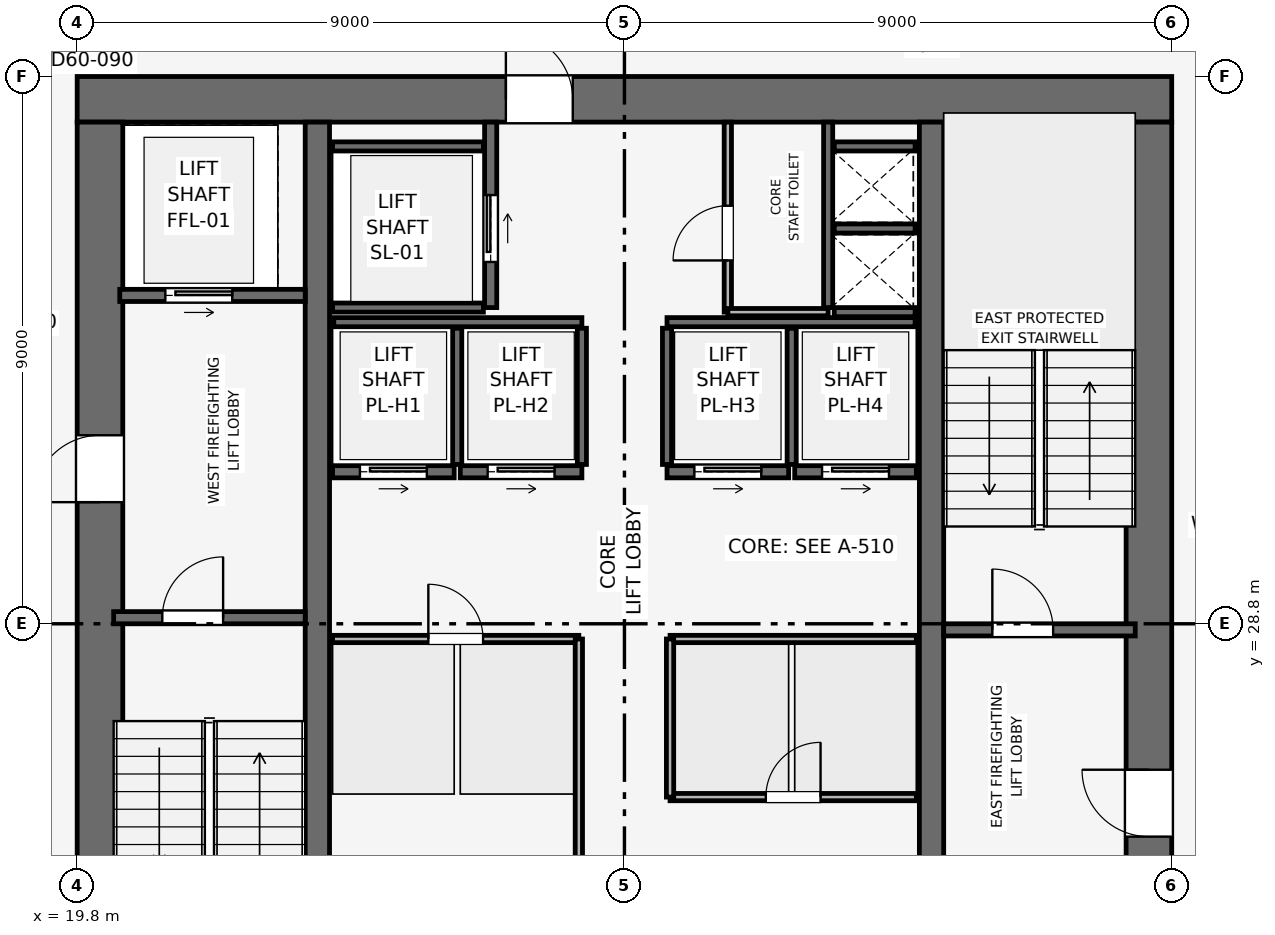
"""IFC4 building model, lengths in metres.
Left out: names, types, materials, properties, quantities, classifications, styles, units other than length and angle.
Written with IfcOpenShell. Run it as: python <this file> out.ifc"""

import sys

from ifc_helpers import new_model, si_unit, direction, frame, frame_2d, origin, place, context, subcontext, project, spatial, rectangle, extrude, element, fill, save


model = new_model("IFC4")
c1 = context("Model", 3, precision=1e-05, world=origin(), true_north=direction((0.0, 1.0)))
c2 = subcontext(c1, "Body", "Model", "MODEL_VIEW")
j1 = project(units=[si_unit("LENGTHUNIT", "METRE"), si_unit("PLANEANGLEUNIT", "RADIAN")], contexts=[c1])
p1 = place(None, origin())
s1 = spatial("IfcSite", under=j1, at=p1, CompositionType="ELEMENT")
p2 = place(p1, origin())
s2 = spatial("IfcBuilding", under=s1, at=p2, CompositionType="ELEMENT")
p3 = place(p2, frame((0.0, 0.0, 276.6)))
s3 = spatial("IfcBuildingStorey", under=s2, at=p3, CompositionType="ELEMENT", Elevation=276.6)
p4 = place(p3, frame((19.8, 37.425, 0.0), z_axis=(0.0, 0.0, 1.0), x_axis=(1.0, 0.0, 0.0)))
e1 = element("IfcWall", 1, at=p4, inside=s3, PredefinedType="SHEAR", context=c2, shape_type="SweptSolid", body=[
    extrude(rectangle(XDim=18.0, YDim=0.75, at=frame_2d((9.0, 0.0))), origin(), (0.0, 0.0, 1.0), 3.75),
])
p5 = place(p4, frame((7.05, 0.0, 0.0)))
e2 = element("IfcOpeningElement", 2, at=p5, cuts=e1, PredefinedType="OPENING", context=c2, shape_type="SweptSolid", body=[
    extrude(rectangle(XDim=1.1, YDim=2.15, at=frame_2d((0.55, 1.075))), frame((0.0, 0.385, 0.0), z_axis=(0.0, -1.0, 0.0), x_axis=(1.0, 0.0, 0.0)), (0.0, 0.0, 1.0), 0.77),
])
p6 = place(p3, frame((20.175, 20.55, 0.0), z_axis=(0.0, 0.0, 1.0), x_axis=(0.0, 1.0, 0.0)))
e3 = element("IfcWall", 3, at=p6, inside=s3, PredefinedType="SHEAR", context=c2, shape_type="SweptSolid", body=[
    extrude(rectangle(XDim=16.5, YDim=0.75, at=frame_2d((8.25, 0.0))), origin(), (0.0, 0.0, 1.0), 3.75),
])
p7 = place(p6, frame((10.25, 0.0, 0.0)))
e4 = element("IfcOpeningElement", 4, at=p7, cuts=e3, PredefinedType="OPENING", context=c2, shape_type="SweptSolid", body=[
    extrude(rectangle(XDim=1.1, YDim=2.15, at=frame_2d((0.55, 1.075))), frame((0.0, 0.385, 0.0), z_axis=(0.0, -1.0, 0.0), x_axis=(1.0, 0.0, 0.0)), (0.0, 0.0, 1.0), 0.77),
])
p8 = place(p3, frame((37.425, 20.55, 0.0), z_axis=(0.0, 0.0, 1.0), x_axis=(0.0, 1.0, 0.0)))
e5 = element("IfcWall", 5, at=p8, inside=s3, PredefinedType="SHEAR", context=c2, shape_type="SweptSolid", body=[
    extrude(rectangle(XDim=16.5, YDim=0.75, at=frame_2d((8.25, 0.0))), origin(), (0.0, 0.0, 1.0), 3.75),
])
p9 = place(p8, frame((4.75, 0.0, 0.0)))
e6 = element("IfcOpeningElement", 6, at=p9, cuts=e5, PredefinedType="OPENING", context=c2, shape_type="SweptSolid", body=[
    extrude(rectangle(XDim=1.1, YDim=2.15, at=frame_2d((0.55, 1.075))), frame((0.0, 0.385, 0.0), z_axis=(0.0, -1.0, 0.0), x_axis=(1.0, 0.0, 0.0)), (0.0, 0.0, 1.0), 0.77),
])
for number, where, z_axis, x_axis in (
    (7, (23.75, 20.55, 0.0), (0.0, 0.0, 1.0), (0.0, 1.0, 0.0)),
    (8, (33.85, 20.55, 0.0), (0.0, 0.0, 1.0), (0.0, 1.0, 0.0)),
):
    element("IfcWall", number, at=place(p3, frame(where, z_axis=z_axis, x_axis=x_axis)), inside=s3, PredefinedType="SHEAR", context=c2, shape_type="SweptSolid", body=[
        extrude(rectangle(XDim=16.5, YDim=0.4, at=frame_2d((8.25, 0.0))), origin(), (0.0, 0.0, 1.0), 3.75),
    ])
p10 = place(p3, frame((20.4, 28.9, 0.0), z_axis=(0.0, 0.0, 1.0), x_axis=(1.0, 0.0, 0.0)))
e9 = element("IfcWall", 9, at=p10, inside=s3, PredefinedType="SHEAR", context=c2, shape_type="SweptSolid", body=[
    extrude(rectangle(XDim=3.15, YDim=0.2, at=frame_2d((1.575, 0.0))), origin(), (0.0, 0.0, 1.0), 3.5),
])
p11 = place(p10, frame((0.8, 0.0, 0.0)))
e10 = element("IfcOpeningElement", 10, at=p11, cuts=e9, PredefinedType="OPENING", context=c2, shape_type="SweptSolid", body=[
    extrude(rectangle(XDim=1.0, YDim=2.1, at=frame_2d((0.5, 1.05))), frame((0.0, 0.11, 0.0), z_axis=(0.0, -1.0, 0.0), x_axis=(1.0, 0.0, 0.0)), (0.0, 0.0, 1.0), 0.22),
])
p12 = place(p3, frame((34.05, 28.7, 0.0), z_axis=(0.0, 0.0, 1.0), x_axis=(1.0, 0.0, 0.0)))
e11 = element("IfcWall", 11, at=p12, inside=s3, PredefinedType="SHEAR", context=c2, shape_type="SweptSolid", body=[
    extrude(rectangle(XDim=3.15, YDim=0.2, at=frame_2d((1.575, 0.0))), origin(), (0.0, 0.0, 1.0), 3.5),
])
p13 = place(p12, frame((0.8, 0.0, 0.0)))
e12 = element("IfcOpeningElement", 12, at=p13, cuts=e11, PredefinedType="OPENING", context=c2, shape_type="SweptSolid", body=[
    extrude(rectangle(XDim=1.0, YDim=2.1, at=frame_2d((0.5, 1.05))), frame((0.0, 0.11, 0.0), z_axis=(0.0, -1.0, 0.0), x_axis=(1.0, 0.0, 0.0)), (0.0, 0.0, 1.0), 0.22),
])
p14 = place(p3, frame((32.15, 34.0, 0.0), z_axis=(0.0, 0.0, 1.0), x_axis=(0.0, 1.0, 0.0)))
e13 = element("IfcWall", 13, at=p14, inside=s3, PredefinedType="SHEAR", context=c2, shape_type="SweptSolid", body=[
    extrude(rectangle(XDim=3.05, YDim=0.15, at=frame_2d((1.525, 0.0))), origin(), (0.0, 0.0, 1.0), 3.5),
])
for number, where, z_axis, x_axis in (
    (14, (32.25, 33.925, 0.0), (0.0, 0.0, 1.0), (1.0, 0.0, 0.0)),
    (15, (32.25, 35.3, 0.0), (0.0, 0.0, 1.0), (1.0, 0.0, 0.0)),
):
    element("IfcWall", number, at=place(p3, frame(where, z_axis=z_axis, x_axis=x_axis)), inside=s3, PredefinedType="SHEAR", context=c2, shape_type="SweptSolid", body=[
        extrude(rectangle(XDim=1.33, YDim=0.15, at=frame_2d((0.665, 0.0))), origin(), (0.0, 0.0, 1.0), 3.5),
    ])
p15 = place(p3, frame((20.5, 34.2, 0.0), z_axis=(0.0, 0.0, 1.0), x_axis=(1.0, 0.0, 0.0)))
e16 = element("IfcWall", 16, at=p15, inside=s3, PredefinedType="SHEAR", context=c2, shape_type="SweptSolid", body=[
    extrude(rectangle(XDim=3.05, YDim=0.2, at=frame_2d((1.525, 0.0))), origin(), (0.0, 0.0, 1.0), 3.5),
])
p16 = place(p15, frame((0.75, 0.0, 0.0)))
e17 = element("IfcOpeningElement", 17, at=p16, cuts=e16, PredefinedType="OPENING", context=c2, shape_type="SweptSolid", body=[
    extrude(rectangle(XDim=1.1, YDim=2.15, at=frame_2d((0.55, 1.075))), frame((0.0, 0.11, 0.0), z_axis=(0.0, -1.0, 0.0), x_axis=(1.0, 0.0, 0.0)), (0.0, 0.0, 1.0), 0.22),
])
p17 = place(p3, frame((26.6, 34.0, 0.0), z_axis=(0.0, 0.0, 1.0), x_axis=(0.0, 1.0, 0.0)))
e18 = element("IfcWall", 18, at=p17, inside=s3, PredefinedType="SHEAR", context=c2, shape_type="SweptSolid", body=[
    extrude(rectangle(XDim=3.05, YDim=0.2, at=frame_2d((1.525, 0.0))), origin(), (0.0, 0.0, 1.0), 3.5),
])
p18 = place(p17, frame((0.75, 0.0, 0.0)))
e19 = element("IfcOpeningElement", 19, at=p18, cuts=e18, PredefinedType="OPENING", context=c2, shape_type="SweptSolid", body=[
    extrude(rectangle(XDim=1.1, YDim=2.15, at=frame_2d((0.55, 1.075))), frame((0.0, 0.11, 0.0), z_axis=(0.0, -1.0, 0.0), x_axis=(1.0, 0.0, 0.0)), (0.0, 0.0, 1.0), 0.22),
])
for number, where, z_axis, x_axis in (
    (20, (24.0, 34.0, 0.0), (0.0, 0.0, 1.0), (1.0, 0.0, 0.0)),
    (21, (24.0, 36.65, 0.0), (0.0, 0.0, 1.0), (1.0, 0.0, 0.0)),
):
    element("IfcWall", number, at=place(p3, frame(where, z_axis=z_axis, x_axis=x_axis)), inside=s3, PredefinedType="SHEAR", context=c2, shape_type="SweptSolid", body=[
        extrude(rectangle(XDim=2.48, YDim=0.15, at=frame_2d((1.24, 0.0))), origin(), (0.0, 0.0, 1.0), 3.5),
    ])
p19 = place(p3, frame((24.0, 31.3, 0.0), z_axis=(0.0, 0.0, 1.0), x_axis=(1.0, 0.0, 0.0)))
e22 = element("IfcWall", 22, at=p19, inside=s3, PredefinedType="SHEAR", context=c2, shape_type="SweptSolid", body=[
    extrude(rectangle(XDim=2.0, YDim=0.2, at=frame_2d((1.0, 0.0))), origin(), (0.0, 0.0, 1.0), 3.5),
])
p20 = place(p19, frame((0.45, 0.0, 0.0)))
e23 = element("IfcOpeningElement", 23, at=p20, cuts=e22, PredefinedType="OPENING", context=c2, shape_type="SweptSolid", body=[
    extrude(rectangle(XDim=1.1, YDim=2.15, at=frame_2d((0.55, 1.075))), frame((0.0, 0.11, 0.0), z_axis=(0.0, -1.0, 0.0), x_axis=(1.0, 0.0, 0.0)), (0.0, 0.0, 1.0), 0.22),
])
p21 = place(p3, frame((26.1, 31.3, 0.0), z_axis=(0.0, 0.0, 1.0), x_axis=(1.0, 0.0, 0.0)))
e24 = element("IfcWall", 24, at=p21, inside=s3, PredefinedType="SHEAR", context=c2, shape_type="SweptSolid", body=[
    extrude(rectangle(XDim=2.0, YDim=0.2, at=frame_2d((1.0, 0.0))), origin(), (0.0, 0.0, 1.0), 3.5),
])
p22 = place(p21, frame((0.45, 0.0, 0.0)))
e25 = element("IfcOpeningElement", 25, at=p22, cuts=e24, PredefinedType="OPENING", context=c2, shape_type="SweptSolid", body=[
    extrude(rectangle(XDim=1.1, YDim=2.15, at=frame_2d((0.55, 1.075))), frame((0.0, 0.11, 0.0), z_axis=(0.0, -1.0, 0.0), x_axis=(1.0, 0.0, 0.0)), (0.0, 0.0, 1.0), 0.22),
])
p23 = place(p3, frame((29.5, 31.3, 0.0), z_axis=(0.0, 0.0, 1.0), x_axis=(1.0, 0.0, 0.0)))
e26 = element("IfcWall", 26, at=p23, inside=s3, PredefinedType="SHEAR", context=c2, shape_type="SweptSolid", body=[
    extrude(rectangle(XDim=2.0, YDim=0.2, at=frame_2d((1.0, 0.0))), origin(), (0.0, 0.0, 1.0), 3.5),
])
p24 = place(p23, frame((0.45, 0.0, 0.0)))
e27 = element("IfcOpeningElement", 27, at=p24, cuts=e26, PredefinedType="OPENING", context=c2, shape_type="SweptSolid", body=[
    extrude(rectangle(XDim=1.1, YDim=2.15, at=frame_2d((0.55, 1.075))), frame((0.0, 0.11, 0.0), z_axis=(0.0, -1.0, 0.0), x_axis=(1.0, 0.0, 0.0)), (0.0, 0.0, 1.0), 0.22),
])
p25 = place(p3, frame((31.6, 31.3, 0.0), z_axis=(0.0, 0.0, 1.0), x_axis=(1.0, 0.0, 0.0)))
e28 = element("IfcWall", 28, at=p25, inside=s3, PredefinedType="SHEAR", context=c2, shape_type="SweptSolid", body=[
    extrude(rectangle(XDim=2.0, YDim=0.2, at=frame_2d((1.0, 0.0))), origin(), (0.0, 0.0, 1.0), 3.5),
])
p26 = place(p25, frame((0.45, 0.0, 0.0)))
e29 = element("IfcOpeningElement", 29, at=p26, cuts=e28, PredefinedType="OPENING", context=c2, shape_type="SweptSolid", body=[
    extrude(rectangle(XDim=1.1, YDim=2.15, at=frame_2d((0.55, 1.075))), frame((0.0, 0.11, 0.0), z_axis=(0.0, -1.0, 0.0), x_axis=(1.0, 0.0, 0.0)), (0.0, 0.0, 1.0), 0.22),
])
p27 = place(p3, frame((32.25, 36.65, 0.0), z_axis=(0.0, 0.0, 1.0), x_axis=(1.0, 0.0, 0.0)))
e30 = element("IfcWall", 30, at=p27, inside=s3, PredefinedType="SHEAR", context=c2, shape_type="SweptSolid", body=[
    extrude(rectangle(XDim=1.33, YDim=0.15, at=frame_2d((0.665, 0.0))), origin(), (0.0, 0.0, 1.0), 3.5),
])
for number, where, z_axis, x_axis in (
    (31, (24.02, 33.76, 0.0), (0.0, 0.0, 1.0), (1.0, 0.0, 0.0)),
    (32, (29.5, 33.76, 0.0), (0.0, 0.0, 1.0), (1.0, 0.0, 0.0)),
):
    element("IfcWall", number, at=place(p3, frame(where, z_axis=z_axis, x_axis=x_axis)), inside=s3, PredefinedType="SHEAR", context=c2, shape_type="SweptSolid", body=[
        extrude(rectangle(XDim=4.08, YDim=0.15, at=frame_2d((2.04, 0.0))), origin(), (0.0, 0.0, 1.0), 3.5),
    ])
for number, where, z_axis, x_axis in (
    (33, (26.05, 31.42, 0.0), (0.0, 0.0, 1.0), (0.0, 1.0, 0.0)),
    (34, (28.1, 31.42, 0.0), (0.0, 0.0, 1.0), (0.0, 1.0, 0.0)),
    (35, (29.5, 31.42, 0.0), (0.0, 0.0, 1.0), (0.0, 1.0, 0.0)),
    (36, (31.55, 31.42, 0.0), (0.0, 0.0, 1.0), (0.0, 1.0, 0.0)),
):
    element("IfcWall", number, at=place(p3, frame(where, z_axis=z_axis, x_axis=x_axis)), inside=s3, PredefinedType="SHEAR", context=c2, shape_type="SweptSolid", body=[
        extrude(rectangle(XDim=2.24, YDim=0.15, at=frame_2d((1.12, 0.0))), origin(), (0.0, 0.0, 1.0), 3.5),
    ])
p28 = place(p3, frame((30.5, 33.925, 0.0), z_axis=(0.0, 0.0, 1.0), x_axis=(0.0, 1.0, 0.0)))
e37 = element("IfcWall", 37, at=p28, inside=s3, PredefinedType="PARTITIONING", context=c2, shape_type="SweptSolid", body=[
    extrude(rectangle(XDim=3.125, YDim=0.12, at=frame_2d((1.562, 0.0))), origin(), (0.0, 0.0, 1.0), 3.5),
])
p29 = place(p28, frame((0.85, 0.0, 0.0)))
e38 = element("IfcOpeningElement", 38, at=p29, cuts=e37, PredefinedType="OPENING", context=c2, shape_type="SweptSolid", body=[
    extrude(rectangle(XDim=0.9, YDim=2.1, at=frame_2d((0.45, 1.05))), frame((0.0, 0.07, 0.0), z_axis=(0.0, -1.0, 0.0), x_axis=(1.0, 0.0, 0.0)), (0.0, 0.0, 1.0), 0.14),
])
p30 = place(p3, frame((30.5, 33.925, 0.0), z_axis=(0.0, 0.0, 1.0), x_axis=(1.0, 0.0, 0.0)))
e39 = element("IfcWall", 39, at=p30, inside=s3, PredefinedType="PARTITIONING", context=c2, shape_type="SweptSolid", body=[
    extrude(rectangle(XDim=1.65, YDim=0.12, at=frame_2d((0.825, 0.0))), origin(), (0.0, 0.0, 1.0), 3.5),
])
p31 = place(p3, frame((24.0, 28.55, 0.0), z_axis=(0.0, 0.0, 1.0), x_axis=(1.0, 0.0, 0.0)))
e40 = element("IfcWall", 40, at=p31, inside=s3, PredefinedType="PARTITIONING", context=c2, shape_type="SweptSolid", body=[
    extrude(rectangle(XDim=4.05, YDim=0.12, at=frame_2d((2.025, 0.0))), origin(), (0.0, 0.0, 1.0), 3.5),
])
p32 = place(p31, frame((1.575, 0.0, 0.0)))
e41 = element("IfcOpeningElement", 41, at=p32, cuts=e40, PredefinedType="OPENING", context=c2, shape_type="SweptSolid", body=[
    extrude(rectangle(XDim=0.9, YDim=2.1, at=frame_2d((0.45, 1.05))), frame((0.0, 0.07, 0.0), z_axis=(0.0, -1.0, 0.0), x_axis=(1.0, 0.0, 0.0)), (0.0, 0.0, 1.0), 0.14),
])
p33 = place(p3, frame((28.05, 20.4, 0.0), z_axis=(0.0, 0.0, 1.0), x_axis=(0.0, 1.0, 0.0)))
e42 = element("IfcWall", 42, at=p33, inside=s3, PredefinedType="PARTITIONING", context=c2, shape_type="SweptSolid", body=[
    extrude(rectangle(XDim=8.15, YDim=0.12, at=frame_2d((4.075, 0.0))), origin(), (0.0, 0.0, 1.0), 3.5),
])
p34 = place(p3, frame((29.55, 25.95, 0.0), z_axis=(0.0, 0.0, 1.0), x_axis=(1.0, 0.0, 0.0)))
e43 = element("IfcWall", 43, at=p34, inside=s3, PredefinedType="PARTITIONING", context=c2, shape_type="SweptSolid", body=[
    extrude(rectangle(XDim=4.05, YDim=0.12, at=frame_2d((2.025, 0.0))), origin(), (0.0, 0.0, 1.0), 3.5),
])
p35 = place(p34, frame((1.575, 0.0, 0.0)))
e44 = element("IfcOpeningElement", 44, at=p35, cuts=e43, PredefinedType="OPENING", context=c2, shape_type="SweptSolid", body=[
    extrude(rectangle(XDim=0.9, YDim=2.1, at=frame_2d((0.45, 1.05))), frame((0.0, 0.07, 0.0), z_axis=(0.0, -1.0, 0.0), x_axis=(1.0, 0.0, 0.0)), (0.0, 0.0, 1.0), 0.14),
])
p36 = place(p3, frame((29.55, 28.55, 0.0), z_axis=(0.0, 0.0, 1.0), x_axis=(1.0, 0.0, 0.0)))
e45 = element("IfcWall", 45, at=p36, inside=s3, PredefinedType="PARTITIONING", context=c2, shape_type="SweptSolid", body=[
    extrude(rectangle(XDim=4.05, YDim=0.12, at=frame_2d((2.025, 0.0))), origin(), (0.0, 0.0, 1.0), 3.5),
])
p37 = place(p3, frame((29.55, 25.95, 0.0), z_axis=(0.0, 0.0, 1.0), x_axis=(0.0, 1.0, 0.0)))
e46 = element("IfcWall", 46, at=p37, inside=s3, PredefinedType="PARTITIONING", context=c2, shape_type="SweptSolid", body=[
    extrude(rectangle(XDim=2.6, YDim=0.12, at=frame_2d((1.3, 0.0))), origin(), (0.0, 0.0, 1.0), 3.5),
])
p38 = place(p11, origin())
e47 = element("IfcDoor", 47, at=p38, inside=s3, OperationType="SINGLE_SWING_RIGHT", PredefinedType="DOOR", context=c2, shape_type="SweptSolid", body=[
    extrude(rectangle(XDim=1.0, YDim=2.1, at=frame_2d((0.5, 1.05))), frame((0.0, 0.025, 0.0), z_axis=(0.0, -1.0, 0.0), x_axis=(1.0, 0.0, 0.0)), (0.0, 0.0, 1.0), 0.05),
])
fill(e10, e47)
p39 = place(p13, origin())
e48 = element("IfcDoor", 48, at=p39, inside=s3, OperationType="SINGLE_SWING_LEFT", PredefinedType="DOOR", context=c2, shape_type="SweptSolid", body=[
    extrude(rectangle(XDim=1.0, YDim=2.1, at=frame_2d((0.5, 1.05))), frame((0.0, 0.025, 0.0), z_axis=(0.0, -1.0, 0.0), x_axis=(1.0, 0.0, 0.0)), (0.0, 0.0, 1.0), 0.05),
])
fill(e12, e48)
p40 = place(p16, origin())
e49 = element("IfcDoor", 49, at=p40, inside=s3, OperationType="SLIDING_TO_RIGHT", PredefinedType="DOOR", context=c2, shape_type="SweptSolid", body=[
    extrude(rectangle(XDim=1.1, YDim=2.15, at=frame_2d((0.55, 1.075))), frame((0.0, 0.025, 0.0), z_axis=(0.0, -1.0, 0.0), x_axis=(1.0, 0.0, 0.0)), (0.0, 0.0, 1.0), 0.05),
])
fill(e17, e49)
p41 = place(p18, origin())
e50 = element("IfcDoor", 50, at=p41, inside=s3, OperationType="SLIDING_TO_RIGHT", PredefinedType="DOOR", context=c2, shape_type="SweptSolid", body=[
    extrude(rectangle(XDim=1.1, YDim=2.15, at=frame_2d((0.55, 1.075))), frame((0.0, 0.025, 0.0), z_axis=(0.0, -1.0, 0.0), x_axis=(1.0, 0.0, 0.0)), (0.0, 0.0, 1.0), 0.05),
])
fill(e19, e50)
p42 = place(p20, origin())
e51 = element("IfcDoor", 51, at=p42, inside=s3, OperationType="SLIDING_TO_RIGHT", PredefinedType="DOOR", context=c2, shape_type="SweptSolid", body=[
    extrude(rectangle(XDim=1.1, YDim=2.15, at=frame_2d((0.55, 1.075))), frame((0.0, 0.025, 0.0), z_axis=(0.0, -1.0, 0.0), x_axis=(1.0, 0.0, 0.0)), (0.0, 0.0, 1.0), 0.05),
])
fill(e23, e51)
p43 = place(p22, origin())
e52 = element("IfcDoor", 52, at=p43, inside=s3, OperationType="SLIDING_TO_RIGHT", PredefinedType="DOOR", context=c2, shape_type="SweptSolid", body=[
    extrude(rectangle(XDim=1.1, YDim=2.15, at=frame_2d((0.55, 1.075))), frame((0.0, 0.025, 0.0), z_axis=(0.0, -1.0, 0.0), x_axis=(1.0, 0.0, 0.0)), (0.0, 0.0, 1.0), 0.05),
])
fill(e25, e52)
p44 = place(p24, origin())
e53 = element("IfcDoor", 53, at=p44, inside=s3, OperationType="SLIDING_TO_RIGHT", PredefinedType="DOOR", context=c2, shape_type="SweptSolid", body=[
    extrude(rectangle(XDim=1.1, YDim=2.15, at=frame_2d((0.55, 1.075))), frame((0.0, 0.025, 0.0), z_axis=(0.0, -1.0, 0.0), x_axis=(1.0, 0.0, 0.0)), (0.0, 0.0, 1.0), 0.05),
])
fill(e27, e53)
p45 = place(p26, origin())
e54 = element("IfcDoor", 54, at=p45, inside=s3, OperationType="SLIDING_TO_RIGHT", PredefinedType="DOOR", context=c2, shape_type="SweptSolid", body=[
    extrude(rectangle(XDim=1.1, YDim=2.15, at=frame_2d((0.55, 1.075))), frame((0.0, 0.025, 0.0), z_axis=(0.0, -1.0, 0.0), x_axis=(1.0, 0.0, 0.0)), (0.0, 0.0, 1.0), 0.05),
])
fill(e29, e54)
p46 = place(p29, origin())
e55 = element("IfcDoor", 55, at=p46, inside=s3, OperationType="SINGLE_SWING_LEFT", PredefinedType="DOOR", context=c2, shape_type="SweptSolid", body=[
    extrude(rectangle(XDim=0.9, YDim=2.1, at=frame_2d((0.45, 1.05))), frame((0.0, 0.025, 0.0), z_axis=(0.0, -1.0, 0.0), x_axis=(1.0, 0.0, 0.0)), (0.0, 0.0, 1.0), 0.05),
])
fill(e38, e55)
p47 = place(p32, origin())
e56 = element("IfcDoor", 56, at=p47, inside=s3, OperationType="SINGLE_SWING_LEFT", PredefinedType="DOOR", context=c2, shape_type="SweptSolid", body=[
    extrude(rectangle(XDim=0.9, YDim=2.1, at=frame_2d((0.45, 1.05))), frame((0.0, 0.025, 0.0), z_axis=(0.0, -1.0, 0.0), x_axis=(1.0, 0.0, 0.0)), (0.0, 0.0, 1.0), 0.05),
])
fill(e41, e56)
p48 = place(p35, origin())
e57 = element("IfcDoor", 57, at=p48, inside=s3, OperationType="SINGLE_SWING_RIGHT", PredefinedType="DOOR", context=c2, shape_type="SweptSolid", body=[
    extrude(rectangle(XDim=0.9, YDim=2.1, at=frame_2d((0.45, 1.05))), frame((0.0, 0.025, 0.0), z_axis=(0.0, -1.0, 0.0), x_axis=(1.0, 0.0, 0.0)), (0.0, 0.0, 1.0), 0.05),
])
fill(e44, e57)
p49 = place(p7, origin())
e58 = element("IfcDoor", 58, at=p49, inside=s3, OperationType="SINGLE_SWING_LEFT", PredefinedType="DOOR", context=c2, shape_type="SweptSolid", body=[
    extrude(rectangle(XDim=1.1, YDim=2.15, at=frame_2d((0.55, 1.075))), frame((0.0, 0.025, 0.0), z_axis=(0.0, -1.0, 0.0), x_axis=(1.0, 0.0, 0.0)), (0.0, 0.0, 1.0), 0.05),
])
fill(e4, e58)
p50 = place(p9, origin())
e59 = element("IfcDoor", 59, at=p50, inside=s3, OperationType="SINGLE_SWING_RIGHT", PredefinedType="DOOR", context=c2, shape_type="SweptSolid", body=[
    extrude(rectangle(XDim=1.1, YDim=2.15, at=frame_2d((0.55, 1.075))), frame((0.0, 0.025, 0.0), z_axis=(0.0, -1.0, 0.0), x_axis=(1.0, 0.0, 0.0)), (0.0, 0.0, 1.0), 0.05),
])
fill(e6, e59)
p51 = place(p5, origin())
e60 = element("IfcDoor", 60, at=p51, inside=s3, OperationType="SINGLE_SWING_LEFT", PredefinedType="DOOR", context=c2, shape_type="SweptSolid", body=[
    extrude(rectangle(XDim=1.1, YDim=2.15, at=frame_2d((0.55, 1.075))), frame((0.0, 0.025, 0.0), z_axis=(0.0, -1.0, 0.0), x_axis=(1.0, 0.0, 0.0)), (0.0, 0.0, 1.0), 0.05),
])
fill(e2, e60)
save(model, sys.argv[1])
